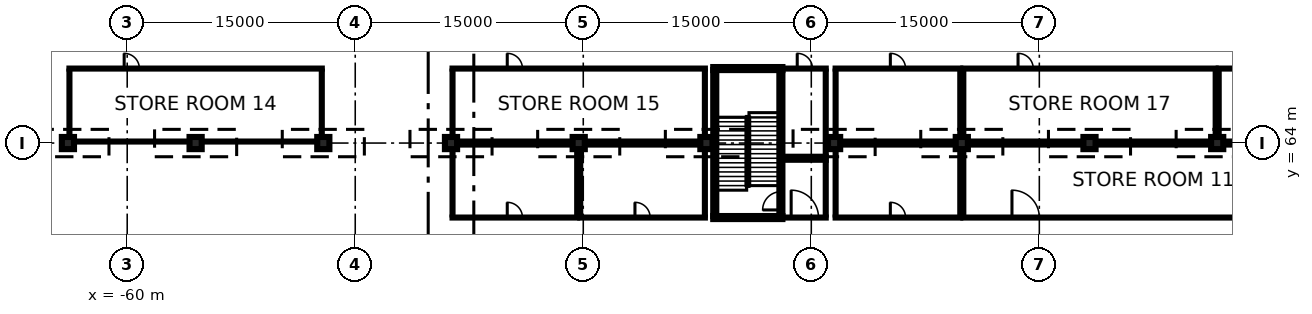
"""IFC4 building model, lengths in metres.
Left out: names, types, materials, properties, quantities, classifications, styles, units other than length and angle.
Written with IfcOpenShell. Run it as: python <this file> out.ifc"""

import sys

from ifc_helpers import new_model, si_unit, direction, frame, frame_2d, origin, origin_2d, place, context, subcontext, project, spatial, rectangle, extrude, element, fill, save


model = new_model("IFC4")
c1 = context("Model", 3, precision=1e-05, world=origin(), true_north=direction((0.0, 1.0)))
c2 = subcontext(c1, "Body", "Model", "MODEL_VIEW")
j1 = project(units=[si_unit("LENGTHUNIT", "METRE"), si_unit("PLANEANGLEUNIT", "RADIAN")], contexts=[c1])
p1 = place(None, origin())
s1 = spatial("IfcSite", under=j1, at=p1, CompositionType="ELEMENT")
p2 = place(p1, origin())
s2 = spatial("IfcBuilding", under=s1, at=p2, CompositionType="ELEMENT")
p3 = place(p2, frame((0.0, 0.0, -12.0)))
s3 = spatial("IfcBuildingStorey", under=s2, at=p3, CompositionType="ELEMENT", Elevation=-12.0)
for number, where, z_axis, x_axis in (
    (1, (-63.9, 64.0, 0.0), (0.0, 0.0, 1.0), (1.0, 0.0, 0.0)),
    (2, (-55.5, 64.0, 0.0), (0.0, 0.0, 1.0), (1.0, 0.0, 0.0)),
    (3, (-47.1, 64.0, 0.0), (0.0, 0.0, 1.0), (1.0, 0.0, 0.0)),
    (4, (-38.7, 64.0, 0.0), (0.0, 0.0, 1.0), (1.0, 0.0, 0.0)),
    (5, (-30.3, 64.0, 0.0), (0.0, 0.0, 1.0), (1.0, 0.0, 0.0)),
    (6, (-21.9, 64.0, 0.0), (0.0, 0.0, 1.0), (1.0, 0.0, 0.0)),
    (7, (-13.5, 64.0, 0.0), (0.0, 0.0, 1.0), (1.0, 0.0, 0.0)),
    (8, (-5.1, 64.0, 0.0), (0.0, 0.0, 1.0), (1.0, 0.0, 0.0)),
    (9, (3.3, 64.0, 0.0), (0.0, 0.0, 1.0), (1.0, 0.0, 0.0)),
    (10, (11.7, 64.0, 0.0), (0.0, 0.0, 1.0), (1.0, 0.0, 0.0)),
):
    element("IfcColumn", number, at=place(p3, frame(where, z_axis=z_axis, x_axis=x_axis)), inside=s3, PredefinedType="COLUMN", context=c2, shape_type="SweptSolid", body=[
        extrude(rectangle(XDim=0.8, YDim=0.8, at=origin_2d()), origin(), (0.0, 0.0, 1.0), 4.4),
    ])
p4 = place(p3, frame((-38.7, 59.1, 0.0), z_axis=(0.0, 0.0, 1.0), x_axis=(1.0, 0.0, 0.0)))
e11 = element("IfcWall", 11, at=p4, inside=s3, PredefinedType="PARTITIONING", context=c2, shape_type="SweptSolid", body=[
    extrude(rectangle(XDim=8.4, YDim=0.2, at=frame_2d((4.2, 0.0))), origin(), (0.0, 0.0, 1.0), 4.4),
])
p5 = place(p4, frame((3.7, 0.0, 0.0)))
e12 = element("IfcOpeningElement", 12, at=p5, cuts=e11, PredefinedType="OPENING", context=c2, shape_type="SweptSolid", body=[
    extrude(rectangle(XDim=1.0, YDim=2.1, at=frame_2d((0.5, 1.05))), frame((0.0, 0.11, 0.0), z_axis=(0.0, -1.0, 0.0), x_axis=(1.0, 0.0, 0.0)), (0.0, 0.0, 1.0), 0.22),
])
p6 = place(p3, frame((-38.7, 63.9, 0.0), z_axis=(0.0, 0.0, 1.0), x_axis=(1.0, 0.0, 0.0)))
e13 = element("IfcWall", 13, at=p6, inside=s3, PredefinedType="PARTITIONING", context=c2, shape_type="SweptSolid", body=[
    extrude(rectangle(XDim=8.4, YDim=0.2, at=frame_2d((4.2, 0.0))), origin(), (0.0, 0.0, 1.0), 4.4),
])
for number, where, z_axis, x_axis in (
    (14, (-38.6, 59.2, 0.0), (0.0, 0.0, 1.0), (0.0, 1.0, 0.0)),
    (15, (-30.4, 59.2, 0.0), (0.0, 0.0, 1.0), (0.0, 1.0, 0.0)),
):
    element("IfcWall", number, at=place(p3, frame(where, z_axis=z_axis, x_axis=x_axis)), inside=s3, PredefinedType="PARTITIONING", context=c2, shape_type="SweptSolid", body=[
        extrude(rectangle(XDim=4.4, YDim=0.2, at=frame_2d((2.2, 0.0))), origin(), (0.0, 0.0, 1.0), 4.4),
    ])
p7 = place(p3, frame((-30.3, 59.1, 0.0), z_axis=(0.0, 0.0, 1.0), x_axis=(1.0, 0.0, 0.0)))
e16 = element("IfcWall", 16, at=p7, inside=s3, PredefinedType="PARTITIONING", context=c2, shape_type="SweptSolid", body=[
    extrude(rectangle(XDim=8.4, YDim=0.2, at=frame_2d((4.2, 0.0))), origin(), (0.0, 0.0, 1.0), 4.4),
])
p8 = place(p7, frame((3.7, 0.0, 0.0)))
e17 = element("IfcOpeningElement", 17, at=p8, cuts=e16, PredefinedType="OPENING", context=c2, shape_type="SweptSolid", body=[
    extrude(rectangle(XDim=1.0, YDim=2.1, at=frame_2d((0.5, 1.05))), frame((0.0, 0.11, 0.0), z_axis=(0.0, -1.0, 0.0), x_axis=(1.0, 0.0, 0.0)), (0.0, 0.0, 1.0), 0.22),
])
p9 = place(p3, frame((-30.3, 63.9, 0.0), z_axis=(0.0, 0.0, 1.0), x_axis=(1.0, 0.0, 0.0)))
e18 = element("IfcWall", 18, at=p9, inside=s3, PredefinedType="PARTITIONING", context=c2, shape_type="SweptSolid", body=[
    extrude(rectangle(XDim=8.4, YDim=0.2, at=frame_2d((4.2, 0.0))), origin(), (0.0, 0.0, 1.0), 4.4),
])
for number, where, z_axis, x_axis in (
    (19, (-30.2, 59.2, 0.0), (0.0, 0.0, 1.0), (0.0, 1.0, 0.0)),
    (20, (-22.0, 59.2, 0.0), (0.0, 0.0, 1.0), (0.0, 1.0, 0.0)),
):
    element("IfcWall", number, at=place(p3, frame(where, z_axis=z_axis, x_axis=x_axis)), inside=s3, PredefinedType="PARTITIONING", context=c2, shape_type="SweptSolid", body=[
        extrude(rectangle(XDim=4.4, YDim=0.2, at=frame_2d((2.2, 0.0))), origin(), (0.0, 0.0, 1.0), 4.4),
    ])
p10 = place(p3, frame((-13.5, 59.1, 0.0), z_axis=(0.0, 0.0, 1.0), x_axis=(1.0, 0.0, 0.0)))
e21 = element("IfcWall", 21, at=p10, inside=s3, PredefinedType="PARTITIONING", context=c2, shape_type="SweptSolid", body=[
    extrude(rectangle(XDim=8.4, YDim=0.2, at=frame_2d((4.2, 0.0))), origin(), (0.0, 0.0, 1.0), 4.4),
])
p11 = place(p10, frame((3.7, 0.0, 0.0)))
e22 = element("IfcOpeningElement", 22, at=p11, cuts=e21, PredefinedType="OPENING", context=c2, shape_type="SweptSolid", body=[
    extrude(rectangle(XDim=1.0, YDim=2.1, at=frame_2d((0.5, 1.05))), frame((0.0, 0.11, 0.0), z_axis=(0.0, -1.0, 0.0), x_axis=(1.0, 0.0, 0.0)), (0.0, 0.0, 1.0), 0.22),
])
p12 = place(p3, frame((-13.5, 63.9, 0.0), z_axis=(0.0, 0.0, 1.0), x_axis=(1.0, 0.0, 0.0)))
e23 = element("IfcWall", 23, at=p12, inside=s3, PredefinedType="PARTITIONING", context=c2, shape_type="SweptSolid", body=[
    extrude(rectangle(XDim=8.4, YDim=0.2, at=frame_2d((4.2, 0.0))), origin(), (0.0, 0.0, 1.0), 4.4),
])
for number, where, z_axis, x_axis in (
    (24, (-13.4, 59.2, 0.0), (0.0, 0.0, 1.0), (0.0, 1.0, 0.0)),
    (25, (-5.2, 59.2, 0.0), (0.0, 0.0, 1.0), (0.0, 1.0, 0.0)),
):
    element("IfcWall", number, at=place(p3, frame(where, z_axis=z_axis, x_axis=x_axis)), inside=s3, PredefinedType="PARTITIONING", context=c2, shape_type="SweptSolid", body=[
        extrude(rectangle(XDim=4.4, YDim=0.2, at=frame_2d((2.2, 0.0))), origin(), (0.0, 0.0, 1.0), 4.4),
    ])
p13 = place(p3, frame((-5.1, 59.1, 0.0), z_axis=(0.0, 0.0, 1.0), x_axis=(1.0, 0.0, 0.0)))
e26 = element("IfcWall", 26, at=p13, inside=s3, PredefinedType="PARTITIONING", context=c2, shape_type="SweptSolid", body=[
    extrude(rectangle(XDim=25.2, YDim=0.2, at=frame_2d((12.6, 0.0))), origin(), (0.0, 0.0, 1.0), 4.4),
])
p14 = place(p13, frame((3.3, 0.0, 0.0)))
e27 = element("IfcOpeningElement", 27, at=p14, cuts=e26, PredefinedType="OPENING", context=c2, shape_type="SweptSolid", body=[
    extrude(rectangle(XDim=1.8, YDim=2.1, at=frame_2d((0.9, 1.05))), frame((0.0, 0.11, 0.0), z_axis=(0.0, -1.0, 0.0), x_axis=(1.0, 0.0, 0.0)), (0.0, 0.0, 1.0), 0.22),
])
p15 = place(p3, frame((-5.1, 63.9, 0.0), z_axis=(0.0, 0.0, 1.0), x_axis=(1.0, 0.0, 0.0)))
e28 = element("IfcWall", 28, at=p15, inside=s3, PredefinedType="PARTITIONING", context=c2, shape_type="SweptSolid", body=[
    extrude(rectangle(XDim=25.2, YDim=0.2, at=frame_2d((12.6, 0.0))), origin(), (0.0, 0.0, 1.0), 4.4),
])
p16 = place(p3, frame((-5.0, 59.2, 0.0), z_axis=(0.0, 0.0, 1.0), x_axis=(0.0, 1.0, 0.0)))
e29 = element("IfcWall", 29, at=p16, inside=s3, PredefinedType="PARTITIONING", context=c2, shape_type="SweptSolid", body=[
    extrude(rectangle(XDim=4.4, YDim=0.2, at=frame_2d((2.2, 0.0))), origin(), (0.0, 0.0, 1.0), 4.4),
])
p17 = place(p3, frame((-63.9, 64.1, 0.0), z_axis=(0.0, 0.0, 1.0), x_axis=(1.0, 0.0, 0.0)))
e30 = element("IfcWall", 30, at=p17, inside=s3, PredefinedType="PARTITIONING", context=c2, shape_type="SweptSolid", body=[
    extrude(rectangle(XDim=16.8, YDim=0.2, at=frame_2d((8.4, 0.0))), origin(), (0.0, 0.0, 1.0), 4.4),
])
p18 = place(p3, frame((-63.9, 68.9, 0.0), z_axis=(0.0, 0.0, 1.0), x_axis=(1.0, 0.0, 0.0)))
e31 = element("IfcWall", 31, at=p18, inside=s3, PredefinedType="PARTITIONING", context=c2, shape_type="SweptSolid", body=[
    extrude(rectangle(XDim=16.8, YDim=0.2, at=frame_2d((8.4, 0.0))), origin(), (0.0, 0.0, 1.0), 4.4),
])
p19 = place(p18, frame((3.7, 0.0, 0.0)))
e32 = element("IfcOpeningElement", 32, at=p19, cuts=e31, PredefinedType="OPENING", context=c2, shape_type="SweptSolid", body=[
    extrude(rectangle(XDim=1.0, YDim=2.1, at=frame_2d((0.5, 1.05))), frame((0.0, 0.11, 0.0), z_axis=(0.0, -1.0, 0.0), x_axis=(1.0, 0.0, 0.0)), (0.0, 0.0, 1.0), 0.22),
])
for number, where, z_axis, x_axis in (
    (33, (-63.8, 64.4, 0.0), (0.0, 0.0, 1.0), (0.0, 1.0, 0.0)),
    (34, (-47.2, 64.4, 0.0), (0.0, 0.0, 1.0), (0.0, 1.0, 0.0)),
):
    element("IfcWall", number, at=place(p3, frame(where, z_axis=z_axis, x_axis=x_axis)), inside=s3, PredefinedType="PARTITIONING", context=c2, shape_type="SweptSolid", body=[
        extrude(rectangle(XDim=4.4, YDim=0.2, at=frame_2d((2.2, 0.0))), origin(), (0.0, 0.0, 1.0), 4.4),
    ])
p20 = place(p3, frame((-38.7, 64.1, 0.0), z_axis=(0.0, 0.0, 1.0), x_axis=(1.0, 0.0, 0.0)))
e35 = element("IfcWall", 35, at=p20, inside=s3, PredefinedType="PARTITIONING", context=c2, shape_type="SweptSolid", body=[
    extrude(rectangle(XDim=16.8, YDim=0.2, at=frame_2d((8.4, 0.0))), origin(), (0.0, 0.0, 1.0), 4.4),
])
p21 = place(p3, frame((-38.7, 68.9, 0.0), z_axis=(0.0, 0.0, 1.0), x_axis=(1.0, 0.0, 0.0)))
e36 = element("IfcWall", 36, at=p21, inside=s3, PredefinedType="PARTITIONING", context=c2, shape_type="SweptSolid", body=[
    extrude(rectangle(XDim=16.8, YDim=0.2, at=frame_2d((8.4, 0.0))), origin(), (0.0, 0.0, 1.0), 4.4),
])
p22 = place(p21, frame((3.7, 0.0, 0.0)))
e37 = element("IfcOpeningElement", 37, at=p22, cuts=e36, PredefinedType="OPENING", context=c2, shape_type="SweptSolid", body=[
    extrude(rectangle(XDim=1.0, YDim=2.1, at=frame_2d((0.5, 1.05))), frame((0.0, 0.11, 0.0), z_axis=(0.0, -1.0, 0.0), x_axis=(1.0, 0.0, 0.0)), (0.0, 0.0, 1.0), 0.22),
])
for number, where, z_axis, x_axis in (
    (38, (-38.6, 64.4, 0.0), (0.0, 0.0, 1.0), (0.0, 1.0, 0.0)),
    (39, (-22.0, 64.4, 0.0), (0.0, 0.0, 1.0), (0.0, 1.0, 0.0)),
):
    element("IfcWall", number, at=place(p3, frame(where, z_axis=z_axis, x_axis=x_axis)), inside=s3, PredefinedType="PARTITIONING", context=c2, shape_type="SweptSolid", body=[
        extrude(rectangle(XDim=4.4, YDim=0.2, at=frame_2d((2.2, 0.0))), origin(), (0.0, 0.0, 1.0), 4.4),
    ])
p23 = place(p3, frame((-13.5, 64.1, 0.0), z_axis=(0.0, 0.0, 1.0), x_axis=(1.0, 0.0, 0.0)))
e40 = element("IfcWall", 40, at=p23, inside=s3, PredefinedType="PARTITIONING", context=c2, shape_type="SweptSolid", body=[
    extrude(rectangle(XDim=8.4, YDim=0.2, at=frame_2d((4.2, 0.0))), origin(), (0.0, 0.0, 1.0), 4.4),
])
p24 = place(p3, frame((-13.5, 68.9, 0.0), z_axis=(0.0, 0.0, 1.0), x_axis=(1.0, 0.0, 0.0)))
e41 = element("IfcWall", 41, at=p24, inside=s3, PredefinedType="PARTITIONING", context=c2, shape_type="SweptSolid", body=[
    extrude(rectangle(XDim=8.4, YDim=0.2, at=frame_2d((4.2, 0.0))), origin(), (0.0, 0.0, 1.0), 4.4),
])
p25 = place(p24, frame((3.7, 0.0, 0.0)))
e42 = element("IfcOpeningElement", 42, at=p25, cuts=e41, PredefinedType="OPENING", context=c2, shape_type="SweptSolid", body=[
    extrude(rectangle(XDim=1.0, YDim=2.1, at=frame_2d((0.5, 1.05))), frame((0.0, 0.11, 0.0), z_axis=(0.0, -1.0, 0.0), x_axis=(1.0, 0.0, 0.0)), (0.0, 0.0, 1.0), 0.22),
])
for number, where, z_axis, x_axis in (
    (43, (-13.4, 64.4, 0.0), (0.0, 0.0, 1.0), (0.0, 1.0, 0.0)),
    (44, (-5.2, 64.4, 0.0), (0.0, 0.0, 1.0), (0.0, 1.0, 0.0)),
):
    element("IfcWall", number, at=place(p3, frame(where, z_axis=z_axis, x_axis=x_axis)), inside=s3, PredefinedType="PARTITIONING", context=c2, shape_type="SweptSolid", body=[
        extrude(rectangle(XDim=4.4, YDim=0.2, at=frame_2d((2.2, 0.0))), origin(), (0.0, 0.0, 1.0), 4.4),
    ])
p26 = place(p3, frame((-5.1, 64.1, 0.0), z_axis=(0.0, 0.0, 1.0), x_axis=(1.0, 0.0, 0.0)))
e45 = element("IfcWall", 45, at=p26, inside=s3, PredefinedType="PARTITIONING", context=c2, shape_type="SweptSolid", body=[
    extrude(rectangle(XDim=16.8, YDim=0.2, at=frame_2d((8.4, 0.0))), origin(), (0.0, 0.0, 1.0), 4.4),
])
p27 = place(p3, frame((-5.1, 68.9, 0.0), z_axis=(0.0, 0.0, 1.0), x_axis=(1.0, 0.0, 0.0)))
e46 = element("IfcWall", 46, at=p27, inside=s3, PredefinedType="PARTITIONING", context=c2, shape_type="SweptSolid", body=[
    extrude(rectangle(XDim=16.8, YDim=0.2, at=frame_2d((8.4, 0.0))), origin(), (0.0, 0.0, 1.0), 4.4),
])
p28 = place(p27, frame((3.7, 0.0, 0.0)))
e47 = element("IfcOpeningElement", 47, at=p28, cuts=e46, PredefinedType="OPENING", context=c2, shape_type="SweptSolid", body=[
    extrude(rectangle(XDim=1.0, YDim=2.1, at=frame_2d((0.5, 1.05))), frame((0.0, 0.11, 0.0), z_axis=(0.0, -1.0, 0.0), x_axis=(1.0, 0.0, 0.0)), (0.0, 0.0, 1.0), 0.22),
])
for number, where, z_axis, x_axis in (
    (48, (-5.0, 64.4, 0.0), (0.0, 0.0, 1.0), (0.0, 1.0, 0.0)),
    (49, (11.6, 64.4, 0.0), (0.0, 0.0, 1.0), (0.0, 1.0, 0.0)),
):
    element("IfcWall", number, at=place(p3, frame(where, z_axis=z_axis, x_axis=x_axis)), inside=s3, PredefinedType="PARTITIONING", context=c2, shape_type="SweptSolid", body=[
        extrude(rectangle(XDim=4.4, YDim=0.2, at=frame_2d((2.2, 0.0))), origin(), (0.0, 0.0, 1.0), 4.4),
    ])
p29 = place(p3, frame((11.7, 64.1, 0.0), z_axis=(0.0, 0.0, 1.0), x_axis=(1.0, 0.0, 0.0)))
e50 = element("IfcWall", 50, at=p29, inside=s3, PredefinedType="PARTITIONING", context=c2, shape_type="SweptSolid", body=[
    extrude(rectangle(XDim=8.4, YDim=0.2, at=frame_2d((4.2, 0.0))), origin(), (0.0, 0.0, 1.0), 4.4),
])
p30 = place(p3, frame((11.7, 68.9, 0.0), z_axis=(0.0, 0.0, 1.0), x_axis=(1.0, 0.0, 0.0)))
e51 = element("IfcWall", 51, at=p30, inside=s3, PredefinedType="PARTITIONING", context=c2, shape_type="SweptSolid", body=[
    extrude(rectangle(XDim=8.4, YDim=0.2, at=frame_2d((4.2, 0.0))), origin(), (0.0, 0.0, 1.0), 4.4),
])
p31 = place(p30, frame((3.7, 0.0, 0.0)))
e52 = element("IfcOpeningElement", 52, at=p31, cuts=e51, PredefinedType="OPENING", context=c2, shape_type="SweptSolid", body=[
    extrude(rectangle(XDim=1.0, YDim=2.1, at=frame_2d((0.5, 1.05))), frame((0.0, 0.11, 0.0), z_axis=(0.0, -1.0, 0.0), x_axis=(1.0, 0.0, 0.0)), (0.0, 0.0, 1.0), 0.22),
])
p32 = place(p3, frame((11.8, 64.4, 0.0), z_axis=(0.0, 0.0, 1.0), x_axis=(0.0, 1.0, 0.0)))
e53 = element("IfcWall", 53, at=p32, inside=s3, PredefinedType="PARTITIONING", context=c2, shape_type="SweptSolid", body=[
    extrude(rectangle(XDim=4.4, YDim=0.2, at=frame_2d((2.2, 0.0))), origin(), (0.0, 0.0, 1.0), 4.4),
])
p33 = place(p3, frame((-16.9, 59.1, 0.0), z_axis=(0.0, 0.0, 1.0), x_axis=(1.0, 0.0, 0.0)))
e54 = element("IfcWall", 54, at=p33, inside=s3, PredefinedType="PARTITIONING", context=c2, shape_type="SweptSolid", body=[
    extrude(rectangle(XDim=2.95, YDim=0.2, at=frame_2d((1.475, 0.0))), origin(), (0.0, 0.0, 1.0), 4.4),
])
p34 = place(p33, frame((0.575, 0.0, 0.0)))
e55 = element("IfcOpeningElement", 55, at=p34, cuts=e54, PredefinedType="OPENING", context=c2, shape_type="SweptSolid", body=[
    extrude(rectangle(XDim=1.8, YDim=2.1, at=frame_2d((0.9, 1.05))), frame((0.0, 0.11, 0.0), z_axis=(0.0, -1.0, 0.0), x_axis=(1.0, 0.0, 0.0)), (0.0, 0.0, 1.0), 0.22),
])
p35 = place(p3, frame((-16.9, 62.9, 0.0), z_axis=(0.0, 0.0, 1.0), x_axis=(1.0, 0.0, 0.0)))
e56 = element("IfcWall", 56, at=p35, inside=s3, PredefinedType="PARTITIONING", context=c2, shape_type="SweptSolid", body=[
    extrude(rectangle(XDim=2.95, YDim=0.2, at=frame_2d((1.475, 0.0))), origin(), (0.0, 0.0, 1.0), 4.4),
])
p36 = place(p3, frame((-14.05, 59.2, 0.0), z_axis=(0.0, 0.0, 1.0), x_axis=(0.0, 1.0, 0.0)))
e57 = element("IfcWall", 57, at=p36, inside=s3, PredefinedType="PARTITIONING", context=c2, shape_type="SweptSolid", body=[
    extrude(rectangle(XDim=3.6, YDim=0.2, at=frame_2d((1.8, 0.0))), origin(), (0.0, 0.0, 1.0), 4.4),
])
p37 = place(p3, frame((-16.9, 63.1, 0.0), z_axis=(0.0, 0.0, 1.0), x_axis=(1.0, 0.0, 0.0)))
e58 = element("IfcWall", 58, at=p37, inside=s3, PredefinedType="PARTITIONING", context=c2, shape_type="SweptSolid", body=[
    extrude(rectangle(XDim=2.95, YDim=0.2, at=frame_2d((1.475, 0.0))), origin(), (0.0, 0.0, 1.0), 4.4),
])
p38 = place(p3, frame((-16.9, 68.9, 0.0), z_axis=(0.0, 0.0, 1.0), x_axis=(1.0, 0.0, 0.0)))
e59 = element("IfcWall", 59, at=p38, inside=s3, PredefinedType="PARTITIONING", context=c2, shape_type="SweptSolid", body=[
    extrude(rectangle(XDim=2.95, YDim=0.2, at=frame_2d((1.475, 0.0))), origin(), (0.0, 0.0, 1.0), 4.4),
])
p39 = place(p38, frame((0.975, 0.0, 0.0)))
e60 = element("IfcOpeningElement", 60, at=p39, cuts=e59, PredefinedType="OPENING", context=c2, shape_type="SweptSolid", body=[
    extrude(rectangle(XDim=1.0, YDim=2.1, at=frame_2d((0.5, 1.05))), frame((0.0, 0.11, 0.0), z_axis=(0.0, -1.0, 0.0), x_axis=(1.0, 0.0, 0.0)), (0.0, 0.0, 1.0), 0.22),
])
p40 = place(p3, frame((-14.05, 63.2, 0.0), z_axis=(0.0, 0.0, 1.0), x_axis=(0.0, 1.0, 0.0)))
e61 = element("IfcWall", 61, at=p40, inside=s3, PredefinedType="PARTITIONING", context=c2, shape_type="SweptSolid", body=[
    extrude(rectangle(XDim=5.6, YDim=0.2, at=frame_2d((2.8, 0.0))), origin(), (0.0, 0.0, 1.0), 4.4),
])
p41 = place(p3, frame((-21.35, 59.2, 0.0), z_axis=(0.0, 0.0, 1.0), x_axis=(0.0, 1.0, 0.0)))
e62 = element("IfcWall", 62, at=p41, inside=s3, PredefinedType="SOLIDWALL", context=c2, shape_type="SweptSolid", body=[
    extrude(rectangle(XDim=9.6, YDim=0.2, at=frame_2d((4.8, 0.0))), origin(), (0.0, 0.0, 1.0), 4.4),
])
p42 = place(p3, frame((-17.0, 59.2, 0.0), z_axis=(0.0, 0.0, 1.0), x_axis=(0.0, 1.0, 0.0)))
e63 = element("IfcWall", 63, at=p42, inside=s3, PredefinedType="SOLIDWALL", context=c2, shape_type="SweptSolid", body=[
    extrude(rectangle(XDim=9.6, YDim=0.2, at=frame_2d((4.8, 0.0))), origin(), (0.0, 0.0, 1.0), 4.4),
])
p43 = place(p42, frame((0.4, 0.0, 0.0)))
e64 = element("IfcOpeningElement", 64, at=p43, cuts=e63, PredefinedType="OPENING", context=c2, shape_type="SweptSolid", body=[
    extrude(rectangle(XDim=1.2, YDim=2.1, at=frame_2d((0.6, 1.05))), frame((0.0, 0.11, 0.0), z_axis=(0.0, -1.0, 0.0), x_axis=(1.0, 0.0, 0.0)), (0.0, 0.0, 1.0), 0.22),
])
for number, where, z_axis, x_axis in (
    (65, (-16.9, 59.1, 0.0), (0.0, 0.0, 1.0), (-1.0, 0.0, 0.0)),
    (66, (-21.45, 68.9, 0.0), (0.0, 0.0, 1.0), (1.0, 0.0, 0.0)),
):
    element("IfcWall", number, at=place(p3, frame(where, z_axis=z_axis, x_axis=x_axis)), inside=s3, PredefinedType="SOLIDWALL", context=c2, shape_type="SweptSolid", body=[
        extrude(rectangle(XDim=4.55, YDim=0.2, at=frame_2d((2.275, 0.0))), origin(), (0.0, 0.0, 1.0), 4.4),
    ])
p44 = place(p5, origin())
e67 = element("IfcDoor", 67, at=p44, inside=s3, OperationType="SINGLE_SWING_LEFT", PredefinedType="DOOR", context=c2, shape_type="SweptSolid", body=[
    extrude(rectangle(XDim=1.0, YDim=2.1, at=frame_2d((0.5, 1.05))), frame((0.0, 0.025, 0.0), z_axis=(0.0, -1.0, 0.0), x_axis=(1.0, 0.0, 0.0)), (0.0, 0.0, 1.0), 0.05),
])
fill(e12, e67)
p45 = place(p8, origin())
e68 = element("IfcDoor", 68, at=p45, inside=s3, OperationType="SINGLE_SWING_LEFT", PredefinedType="DOOR", context=c2, shape_type="SweptSolid", body=[
    extrude(rectangle(XDim=1.0, YDim=2.1, at=frame_2d((0.5, 1.05))), frame((0.0, 0.025, 0.0), z_axis=(0.0, -1.0, 0.0), x_axis=(1.0, 0.0, 0.0)), (0.0, 0.0, 1.0), 0.05),
])
fill(e17, e68)
p46 = place(p11, origin())
e69 = element("IfcDoor", 69, at=p46, inside=s3, OperationType="SINGLE_SWING_LEFT", PredefinedType="DOOR", context=c2, shape_type="SweptSolid", body=[
    extrude(rectangle(XDim=1.0, YDim=2.1, at=frame_2d((0.5, 1.05))), frame((0.0, 0.025, 0.0), z_axis=(0.0, -1.0, 0.0), x_axis=(1.0, 0.0, 0.0)), (0.0, 0.0, 1.0), 0.05),
])
fill(e22, e69)
p47 = place(p14, origin())
e70 = element("IfcDoor", 70, at=p47, inside=s3, OperationType="DOUBLE_DOOR_SINGLE_SWING", PredefinedType="DOOR", context=c2, shape_type="SweptSolid", body=[
    extrude(rectangle(XDim=1.8, YDim=2.1, at=frame_2d((0.9, 1.05))), frame((0.0, 0.025, 0.0), z_axis=(0.0, -1.0, 0.0), x_axis=(1.0, 0.0, 0.0)), (0.0, 0.0, 1.0), 0.05),
])
fill(e27, e70)
p48 = place(p19, origin())
e71 = element("IfcDoor", 71, at=p48, inside=s3, OperationType="SINGLE_SWING_LEFT", PredefinedType="DOOR", context=c2, shape_type="SweptSolid", body=[
    extrude(rectangle(XDim=1.0, YDim=2.1, at=frame_2d((0.5, 1.05))), frame((0.0, 0.025, 0.0), z_axis=(0.0, -1.0, 0.0), x_axis=(1.0, 0.0, 0.0)), (0.0, 0.0, 1.0), 0.05),
])
fill(e32, e71)
p49 = place(p22, origin())
e72 = element("IfcDoor", 72, at=p49, inside=s3, OperationType="SINGLE_SWING_LEFT", PredefinedType="DOOR", context=c2, shape_type="SweptSolid", body=[
    extrude(rectangle(XDim=1.0, YDim=2.1, at=frame_2d((0.5, 1.05))), frame((0.0, 0.025, 0.0), z_axis=(0.0, -1.0, 0.0), x_axis=(1.0, 0.0, 0.0)), (0.0, 0.0, 1.0), 0.05),
])
fill(e37, e72)
p50 = place(p25, origin())
e73 = element("IfcDoor", 73, at=p50, inside=s3, OperationType="SINGLE_SWING_LEFT", PredefinedType="DOOR", context=c2, shape_type="SweptSolid", body=[
    extrude(rectangle(XDim=1.0, YDim=2.1, at=frame_2d((0.5, 1.05))), frame((0.0, 0.025, 0.0), z_axis=(0.0, -1.0, 0.0), x_axis=(1.0, 0.0, 0.0)), (0.0, 0.0, 1.0), 0.05),
])
fill(e42, e73)
p51 = place(p28, origin())
e74 = element("IfcDoor", 74, at=p51, inside=s3, OperationType="SINGLE_SWING_LEFT", PredefinedType="DOOR", context=c2, shape_type="SweptSolid", body=[
    extrude(rectangle(XDim=1.0, YDim=2.1, at=frame_2d((0.5, 1.05))), frame((0.0, 0.025, 0.0), z_axis=(0.0, -1.0, 0.0), x_axis=(1.0, 0.0, 0.0)), (0.0, 0.0, 1.0), 0.05),
])
fill(e47, e74)
p52 = place(p34, origin())
e75 = element("IfcDoor", 75, at=p52, inside=s3, OperationType="DOUBLE_DOOR_SINGLE_SWING", PredefinedType="DOOR", context=c2, shape_type="SweptSolid", body=[
    extrude(rectangle(XDim=1.8, YDim=2.1, at=frame_2d((0.9, 1.05))), frame((0.0, 0.025, 0.0), z_axis=(0.0, -1.0, 0.0), x_axis=(1.0, 0.0, 0.0)), (0.0, 0.0, 1.0), 0.05),
])
fill(e55, e75)
p53 = place(p39, origin())
e76 = element("IfcDoor", 76, at=p53, inside=s3, OperationType="SINGLE_SWING_LEFT", PredefinedType="DOOR", context=c2, shape_type="SweptSolid", body=[
    extrude(rectangle(XDim=1.0, YDim=2.1, at=frame_2d((0.5, 1.05))), frame((0.0, 0.025, 0.0), z_axis=(0.0, -1.0, 0.0), x_axis=(1.0, 0.0, 0.0)), (0.0, 0.0, 1.0), 0.05),
])
fill(e60, e76)
p54 = place(p43, origin())
e77 = element("IfcDoor", 77, at=p54, inside=s3, OperationType="SINGLE_SWING_LEFT", PredefinedType="DOOR", context=c2, shape_type="SweptSolid", body=[
    extrude(rectangle(XDim=1.2, YDim=2.1, at=frame_2d((0.6, 1.05))), frame((0.0, 0.025, 0.0), z_axis=(0.0, -1.0, 0.0), x_axis=(1.0, 0.0, 0.0)), (0.0, 0.0, 1.0), 0.05),
])
fill(e64, e77)
save(model, sys.argv[1])
